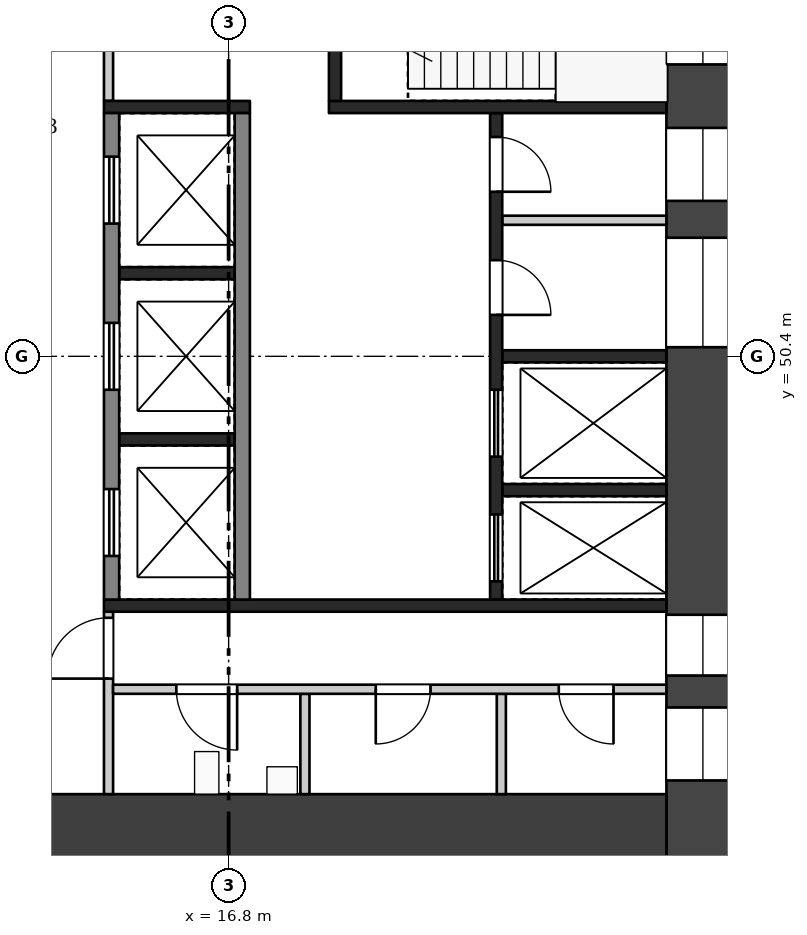
"""IFC4 building model, lengths in metres.
Left out: names, types, materials, properties, quantities, classifications, styles, units other than length and angle.
Written with IfcOpenShell. Run it as: python <this file> out.ifc"""

import sys

from ifc_helpers import new_model, si_unit, direction, frame, frame_2d, origin, place, context, subcontext, project, spatial, rectangle, extrude, element, fill, save


model = new_model("IFC4")
c1 = context("Model", 3, precision=1e-05, world=origin(), true_north=direction((0.0, 1.0)))
c2 = subcontext(c1, "Body", "Model", "MODEL_VIEW")
j1 = project(units=[si_unit("LENGTHUNIT", "METRE"), si_unit("PLANEANGLEUNIT", "RADIAN")], contexts=[c1])
p1 = place(None, origin())
s1 = spatial("IfcSite", under=j1, at=p1, CompositionType="ELEMENT")
p2 = place(p1, origin())
s2 = spatial("IfcBuilding", under=s1, at=p2, CompositionType="ELEMENT")
p3 = place(p2, frame((0.0, 0.0, 189.7)))
s3 = spatial("IfcBuildingStorey", under=s2, at=p3, CompositionType="ELEMENT", Elevation=189.7)
p4 = place(p3, frame((24.6, 58.8, 0.0), z_axis=(0.0, 0.0, 1.0), x_axis=(0.0, -1.0, 0.0)))
e1 = element("IfcWall", 1, at=p4, inside=s3, PredefinedType="SHEAR", context=c2, shape_type="SweptSolid", body=[
    extrude(rectangle(XDim=16.8, YDim=1.2, at=frame_2d((8.4, 0.0))), origin(), (0.0, 0.0, 1.0), 3.22),
])
p5 = place(p4, frame((1.8, 0.0, 0.5)))
e2 = element("IfcOpeningElement", 2, at=p5, cuts=e1, PredefinedType="OPENING", context=c2, shape_type="SweptSolid", body=[
    extrude(rectangle(XDim=1.8, YDim=2.4, at=frame_2d((0.9, 1.2))), frame((0.0, 0.61, 0.0), z_axis=(0.0, -1.0, 0.0), x_axis=(1.0, 0.0, 0.0)), (0.0, 0.0, 1.0), 1.22),
])
p6 = place(p4, frame((4.644, 0.0, 1.6)))
e3 = element("IfcOpeningElement", 3, at=p6, cuts=e1, PredefinedType="OPENING", context=c2, shape_type="SweptSolid", body=[
    extrude(rectangle(XDim=1.2, YDim=1.2, at=frame_2d((0.6, 0.6))), frame((0.0, 0.61, 0.0), z_axis=(0.0, -1.0, 0.0), x_axis=(1.0, 0.0, 0.0)), (0.0, 0.0, 1.0), 1.22),
])
p7 = place(p4, frame((6.45, 0.0, 1.6)))
e4 = element("IfcOpeningElement", 4, at=p7, cuts=e1, PredefinedType="OPENING", context=c2, shape_type="SweptSolid", body=[
    extrude(rectangle(XDim=1.8, YDim=1.2, at=frame_2d((0.9, 0.6))), frame((0.0, 0.61, 0.0), z_axis=(0.0, -1.0, 0.0), x_axis=(1.0, 0.0, 0.0)), (0.0, 0.0, 1.0), 1.22),
])
p8 = place(p4, frame((12.65, 0.0, 0.6)))
e5 = element("IfcOpeningElement", 5, at=p8, cuts=e1, PredefinedType="OPENING", context=c2, shape_type="SweptSolid", body=[
    extrude(rectangle(XDim=1.0, YDim=2.1, at=frame_2d((0.5, 1.05))), frame((0.0, 0.61, 0.0), z_axis=(0.0, -1.0, 0.0), x_axis=(1.0, 0.0, 0.0)), (0.0, 0.0, 1.0), 1.22),
])
p9 = place(p4, frame((14.175, 0.0, 1.6)))
e6 = element("IfcOpeningElement", 6, at=p9, cuts=e1, PredefinedType="OPENING", context=c2, shape_type="SweptSolid", body=[
    extrude(rectangle(XDim=1.2, YDim=1.2, at=frame_2d((0.6, 0.6))), frame((0.0, 0.61, 0.0), z_axis=(0.0, -1.0, 0.0), x_axis=(1.0, 0.0, 0.0)), (0.0, 0.0, 1.0), 1.22),
])
p10 = place(p3, frame((9.6, 42.6, 0.0), z_axis=(0.0, 0.0, 1.0), x_axis=(1.0, 0.0, 0.0)))
e7 = element("IfcWall", 7, at=p10, inside=s3, PredefinedType="SHEAR", context=c2, shape_type="SweptSolid", body=[
    extrude(rectangle(XDim=14.4, YDim=1.2, at=frame_2d((7.2, 0.0))), origin(), (0.0, 0.0, 1.0), 3.22),
])
p11 = place(p10, frame((2.1, 0.0, 0.0)))
e8 = element("IfcOpeningElement", 8, at=p11, cuts=e7, PredefinedType="OPENING", context=c2, shape_type="SweptSolid", body=[
    extrude(rectangle(XDim=1.8, YDim=2.1, at=frame_2d((0.9, 1.05))), frame((0.0, 0.61, 0.0), z_axis=(0.0, -1.0, 0.0), x_axis=(1.0, 0.0, 0.0)), (0.0, 0.0, 1.0), 1.22),
])
for number, where, z_axis, x_axis in (
    (9, (15.0, 51.767, 0.0), (0.0, 0.0, 1.0), (1.0, 0.0, 0.0)),
    (10, (15.0, 49.033, 0.0), (0.0, 0.0, 1.0), (1.0, 0.0, 0.0)),
):
    element("IfcWall", number, at=place(p3, frame(where, z_axis=z_axis, x_axis=x_axis)), inside=s3, PredefinedType="SHEAR", context=c2, shape_type="SweptSolid", body=[
        extrude(rectangle(XDim=1.9, YDim=0.2, at=frame_2d((0.95, 0.0))), origin(), (0.0, 0.0, 1.0), 3.22),
    ])
p12 = place(p3, frame((14.875, 54.4, 0.0), z_axis=(0.0, 0.0, 1.0), x_axis=(0.0, -1.0, 0.0)))
e11 = element("IfcWall", 11, at=p12, inside=s3, PredefinedType="SHEAR", context=c2, shape_type="SweptSolid", body=[
    extrude(rectangle(XDim=8.0, YDim=0.25, at=frame_2d((4.0, 0.0))), origin(), (0.0, 0.0, 1.0), 3.22),
])
p13 = place(p12, frame((0.717, 0.0, 0.0)))
e12 = element("IfcOpeningElement", 12, at=p13, cuts=e11, PredefinedType="OPENING", context=c2, shape_type="SweptSolid", body=[
    extrude(rectangle(XDim=1.1, YDim=2.1, at=frame_2d((0.55, 1.05))), frame((0.0, 0.135, 0.0), z_axis=(0.0, -1.0, 0.0), x_axis=(1.0, 0.0, 0.0)), (0.0, 0.0, 1.0), 0.27),
])
p14 = place(p12, frame((3.45, 0.0, 0.0)))
e13 = element("IfcOpeningElement", 13, at=p14, cuts=e11, PredefinedType="OPENING", context=c2, shape_type="SweptSolid", body=[
    extrude(rectangle(XDim=1.1, YDim=2.1, at=frame_2d((0.55, 1.05))), frame((0.0, 0.135, 0.0), z_axis=(0.0, -1.0, 0.0), x_axis=(1.0, 0.0, 0.0)), (0.0, 0.0, 1.0), 0.27),
])
p15 = place(p12, frame((6.183, 0.0, 0.0)))
e14 = element("IfcOpeningElement", 14, at=p15, cuts=e11, PredefinedType="OPENING", context=c2, shape_type="SweptSolid", body=[
    extrude(rectangle(XDim=1.1, YDim=2.1, at=frame_2d((0.55, 1.05))), frame((0.0, 0.135, 0.0), z_axis=(0.0, -1.0, 0.0), x_axis=(1.0, 0.0, 0.0)), (0.0, 0.0, 1.0), 0.27),
])
p16 = place(p3, frame((17.025, 54.4, 0.0), z_axis=(0.0, 0.0, 1.0), x_axis=(0.0, -1.0, 0.0)))
e15 = element("IfcWall", 15, at=p16, inside=s3, PredefinedType="SHEAR", context=c2, shape_type="SweptSolid", body=[
    extrude(rectangle(XDim=8.0, YDim=0.25, at=frame_2d((4.0, 0.0))), origin(), (0.0, 0.0, 1.0), 3.22),
])
for number, where, z_axis, x_axis in (
    (16, (21.3, 50.4, 0.0), (0.0, 0.0, 1.0), (1.0, 0.0, 0.0)),
    (17, (21.3, 48.2, 0.0), (0.0, 0.0, 1.0), (1.0, 0.0, 0.0)),
):
    element("IfcWall", number, at=place(p3, frame(where, z_axis=z_axis, x_axis=x_axis)), inside=s3, PredefinedType="SHEAR", context=c2, shape_type="SweptSolid", body=[
        extrude(rectangle(XDim=2.7, YDim=0.2, at=frame_2d((1.35, 0.0))), origin(), (0.0, 0.0, 1.0), 3.22),
    ])
p17 = place(p3, frame((21.3, 52.637, 0.0), z_axis=(0.0, 0.0, 1.0), x_axis=(1.0, 0.0, 0.0)))
e18 = element("IfcWall", 18, at=p17, inside=s3, PredefinedType="PARTITIONING", context=c2, shape_type="SweptSolid", body=[
    extrude(rectangle(XDim=2.7, YDim=0.15, at=frame_2d((1.35, 0.0))), origin(), (0.0, 0.0, 1.0), 3.22),
])
p18 = place(p3, frame((21.2, 54.4, 0.0), z_axis=(0.0, 0.0, 1.0), x_axis=(0.0, -1.0, 0.0)))
e19 = element("IfcWall", 19, at=p18, inside=s3, PredefinedType="SHEAR", context=c2, shape_type="SweptSolid", body=[
    extrude(rectangle(XDim=8.0, YDim=0.2, at=frame_2d((4.0, 0.0))), origin(), (0.0, 0.0, 1.0), 3.22),
])
p19 = place(p18, frame((0.394, 0.0, 0.0)))
e20 = element("IfcOpeningElement", 20, at=p19, cuts=e19, PredefinedType="OPENING", context=c2, shape_type="SweptSolid", body=[
    extrude(rectangle(XDim=0.9, YDim=2.1, at=frame_2d((0.45, 1.05))), frame((0.0, 0.11, 0.0), z_axis=(0.0, -1.0, 0.0), x_axis=(1.0, 0.0, 0.0)), (0.0, 0.0, 1.0), 0.22),
])
p20 = place(p18, frame((2.419, 0.0, 0.0)))
e21 = element("IfcOpeningElement", 21, at=p20, cuts=e19, PredefinedType="OPENING", context=c2, shape_type="SweptSolid", body=[
    extrude(rectangle(XDim=0.9, YDim=2.1, at=frame_2d((0.45, 1.05))), frame((0.0, 0.11, 0.0), z_axis=(0.0, -1.0, 0.0), x_axis=(1.0, 0.0, 0.0)), (0.0, 0.0, 1.0), 0.22),
])
p21 = place(p18, frame((4.55, 0.0, 0.0)))
e22 = element("IfcOpeningElement", 22, at=p21, cuts=e19, PredefinedType="OPENING", context=c2, shape_type="SweptSolid", body=[
    extrude(rectangle(XDim=1.1, YDim=2.1, at=frame_2d((0.55, 1.05))), frame((0.0, 0.11, 0.0), z_axis=(0.0, -1.0, 0.0), x_axis=(1.0, 0.0, 0.0)), (0.0, 0.0, 1.0), 0.22),
])
p22 = place(p18, frame((6.6, 0.0, 0.0)))
e23 = element("IfcOpeningElement", 23, at=p22, cuts=e19, PredefinedType="OPENING", context=c2, shape_type="SweptSolid", body=[
    extrude(rectangle(XDim=1.1, YDim=2.1, at=frame_2d((0.55, 1.05))), frame((0.0, 0.11, 0.0), z_axis=(0.0, -1.0, 0.0), x_axis=(1.0, 0.0, 0.0)), (0.0, 0.0, 1.0), 0.22),
])
p23 = place(p3, frame((14.75, 54.5, 0.0), z_axis=(0.0, 0.0, 1.0), x_axis=(1.0, 0.0, 0.0)))
e24 = element("IfcWall", 24, at=p23, inside=s3, PredefinedType="SHEAR", context=c2, shape_type="SweptSolid", body=[
    extrude(rectangle(XDim=2.4, YDim=0.2, at=frame_2d((1.2, 0.0))), origin(), (0.0, 0.0, 1.0), 3.22),
])
p24 = place(p3, frame((18.45, 54.5, 0.0), z_axis=(0.0, 0.0, 1.0), x_axis=(1.0, 0.0, 0.0)))
e25 = element("IfcWall", 25, at=p24, inside=s3, PredefinedType="SHEAR", context=c2, shape_type="SweptSolid", body=[
    extrude(rectangle(XDim=5.55, YDim=0.2, at=frame_2d((2.775, 0.0))), origin(), (0.0, 0.0, 1.0), 3.22),
])
p25 = place(p3, frame((14.825, 57.6, 0.0), z_axis=(0.0, 0.0, 1.0), x_axis=(0.0, -1.0, 0.0)))
e26 = element("IfcWall", 26, at=p25, inside=s3, PredefinedType="PARTITIONING", context=c2, shape_type="SweptSolid", body=[
    extrude(rectangle(XDim=3.0, YDim=0.15, at=frame_2d((1.5, 0.0))), origin(), (0.0, 0.0, 1.0), 3.22),
])
p26 = place(p25, frame((1.0, 0.0, 0.0)))
e27 = element("IfcOpeningElement", 27, at=p26, cuts=e26, PredefinedType="OPENING", context=c2, shape_type="SweptSolid", body=[
    extrude(rectangle(XDim=1.0, YDim=2.1, at=frame_2d((0.5, 1.05))), frame((0.0, 0.085, 0.0), z_axis=(0.0, -1.0, 0.0), x_axis=(1.0, 0.0, 0.0)), (0.0, 0.0, 1.0), 0.17),
])
p27 = place(p3, frame((18.55, 57.6, 0.0), z_axis=(0.0, 0.0, 1.0), x_axis=(0.0, -1.0, 0.0)))
e28 = element("IfcWall", 28, at=p27, inside=s3, PredefinedType="SHEAR", context=c2, shape_type="SweptSolid", body=[
    extrude(rectangle(XDim=3.0, YDim=0.2, at=frame_2d((1.5, 0.0))), origin(), (0.0, 0.0, 1.0), 3.22),
])
p28 = place(p27, frame((1.0, 0.0, 0.0)))
e29 = element("IfcOpeningElement", 29, at=p28, cuts=e28, PredefinedType="OPENING", context=c2, shape_type="SweptSolid", body=[
    extrude(rectangle(XDim=1.0, YDim=2.1, at=frame_2d((0.5, 1.05))), frame((0.0, 0.11, 0.0), z_axis=(0.0, -1.0, 0.0), x_axis=(1.0, 0.0, 0.0)), (0.0, 0.0, 1.0), 0.22),
])
p29 = place(p3, frame((14.75, 46.3, 0.0), z_axis=(0.0, 0.0, 1.0), x_axis=(1.0, 0.0, 0.0)))
e30 = element("IfcWall", 30, at=p29, inside=s3, PredefinedType="SHEAR", context=c2, shape_type="SweptSolid", body=[
    extrude(rectangle(XDim=9.25, YDim=0.2, at=frame_2d((4.625, 0.0))), origin(), (0.0, 0.0, 1.0), 3.22),
])
p30 = place(p3, frame((14.825, 46.2, 0.0), z_axis=(0.0, 0.0, 1.0), x_axis=(0.0, -1.0, 0.0)))
e31 = element("IfcWall", 31, at=p30, inside=s3, PredefinedType="PARTITIONING", context=c2, shape_type="SweptSolid", body=[
    extrude(rectangle(XDim=3.0, YDim=0.15, at=frame_2d((1.5, 0.0))), origin(), (0.0, 0.0, 1.0), 3.22),
])
p31 = place(p30, frame((0.1, 0.0, 0.0)))
e32 = element("IfcOpeningElement", 32, at=p31, cuts=e31, PredefinedType="OPENING", context=c2, shape_type="SweptSolid", body=[
    extrude(rectangle(XDim=1.0, YDim=2.1, at=frame_2d((0.5, 1.05))), frame((0.0, 0.085, 0.0), z_axis=(0.0, -1.0, 0.0), x_axis=(1.0, 0.0, 0.0)), (0.0, 0.0, 1.0), 0.17),
])
for number, where, z_axis, x_axis in (
    (33, (18.055, 44.85, 0.0), (0.0, 0.0, 1.0), (0.0, -1.0, 0.0)),
    (34, (21.285, 44.85, 0.0), (0.0, 0.0, 1.0), (0.0, -1.0, 0.0)),
):
    element("IfcWall", number, at=place(p3, frame(where, z_axis=z_axis, x_axis=x_axis)), inside=s3, PredefinedType="PARTITIONING", context=c2, shape_type="SweptSolid", body=[
        extrude(rectangle(XDim=1.65, YDim=0.15, at=frame_2d((0.825, 0.0))), origin(), (0.0, 0.0, 1.0), 3.22),
    ])
p32 = place(p3, frame((14.9, 44.925, 0.0), z_axis=(0.0, 0.0, 1.0), x_axis=(1.0, 0.0, 0.0)))
e35 = element("IfcWall", 35, at=p32, inside=s3, PredefinedType="PARTITIONING", context=c2, shape_type="SweptSolid", body=[
    extrude(rectangle(XDim=9.1, YDim=0.15, at=frame_2d((4.55, 0.0))), origin(), (0.0, 0.0, 1.0), 3.22),
])
p33 = place(p32, frame((1.04, 0.0, 0.0)))
e36 = element("IfcOpeningElement", 36, at=p33, cuts=e35, PredefinedType="OPENING", context=c2, shape_type="SweptSolid", body=[
    extrude(rectangle(XDim=1.0, YDim=2.1, at=frame_2d((0.5, 1.05))), frame((0.0, 0.085, 0.0), z_axis=(0.0, -1.0, 0.0), x_axis=(1.0, 0.0, 0.0)), (0.0, 0.0, 1.0), 0.17),
])
p34 = place(p32, frame((4.32, 0.0, 0.0)))
e37 = element("IfcOpeningElement", 37, at=p34, cuts=e35, PredefinedType="OPENING", context=c2, shape_type="SweptSolid", body=[
    extrude(rectangle(XDim=0.9, YDim=2.1, at=frame_2d((0.45, 1.05))), frame((0.0, 0.085, 0.0), z_axis=(0.0, -1.0, 0.0), x_axis=(1.0, 0.0, 0.0)), (0.0, 0.0, 1.0), 0.17),
])
p35 = place(p32, frame((7.33, 0.0, 0.0)))
e38 = element("IfcOpeningElement", 38, at=p35, cuts=e35, PredefinedType="OPENING", context=c2, shape_type="SweptSolid", body=[
    extrude(rectangle(XDim=0.9, YDim=2.1, at=frame_2d((0.45, 1.05))), frame((0.0, 0.085, 0.0), z_axis=(0.0, -1.0, 0.0), x_axis=(1.0, 0.0, 0.0)), (0.0, 0.0, 1.0), 0.17),
])
p36 = place(p13, origin())
e39 = element("IfcDoor", 39, at=p36, inside=s3, OperationType="DOUBLE_DOOR_SLIDING", PredefinedType="DOOR", context=c2, shape_type="SweptSolid", body=[
    extrude(rectangle(XDim=1.1, YDim=2.1, at=frame_2d((0.55, 1.05))), frame((0.0, 0.025, 0.0), z_axis=(0.0, -1.0, 0.0), x_axis=(1.0, 0.0, 0.0)), (0.0, 0.0, 1.0), 0.05),
])
fill(e12, e39)
p37 = place(p14, origin())
e40 = element("IfcDoor", 40, at=p37, inside=s3, OperationType="DOUBLE_DOOR_SLIDING", PredefinedType="DOOR", context=c2, shape_type="SweptSolid", body=[
    extrude(rectangle(XDim=1.1, YDim=2.1, at=frame_2d((0.55, 1.05))), frame((0.0, 0.025, 0.0), z_axis=(0.0, -1.0, 0.0), x_axis=(1.0, 0.0, 0.0)), (0.0, 0.0, 1.0), 0.05),
])
fill(e13, e40)
p38 = place(p15, origin())
e41 = element("IfcDoor", 41, at=p38, inside=s3, OperationType="DOUBLE_DOOR_SLIDING", PredefinedType="DOOR", context=c2, shape_type="SweptSolid", body=[
    extrude(rectangle(XDim=1.1, YDim=2.1, at=frame_2d((0.55, 1.05))), frame((0.0, 0.025, 0.0), z_axis=(0.0, -1.0, 0.0), x_axis=(1.0, 0.0, 0.0)), (0.0, 0.0, 1.0), 0.05),
])
fill(e14, e41)
p39 = place(p19, origin())
e42 = element("IfcDoor", 42, at=p39, inside=s3, OperationType="SINGLE_SWING_RIGHT", PredefinedType="DOOR", context=c2, shape_type="SweptSolid", body=[
    extrude(rectangle(XDim=0.9, YDim=2.1, at=frame_2d((0.45, 1.05))), frame((0.0, 0.025, 0.0), z_axis=(0.0, -1.0, 0.0), x_axis=(1.0, 0.0, 0.0)), (0.0, 0.0, 1.0), 0.05),
])
fill(e20, e42)
p40 = place(p20, origin())
e43 = element("IfcDoor", 43, at=p40, inside=s3, OperationType="SINGLE_SWING_RIGHT", PredefinedType="DOOR", context=c2, shape_type="SweptSolid", body=[
    extrude(rectangle(XDim=0.9, YDim=2.1, at=frame_2d((0.45, 1.05))), frame((0.0, 0.025, 0.0), z_axis=(0.0, -1.0, 0.0), x_axis=(1.0, 0.0, 0.0)), (0.0, 0.0, 1.0), 0.05),
])
fill(e21, e43)
p41 = place(p21, origin())
e44 = element("IfcDoor", 44, at=p41, inside=s3, OperationType="DOUBLE_DOOR_SLIDING", PredefinedType="DOOR", context=c2, shape_type="SweptSolid", body=[
    extrude(rectangle(XDim=1.1, YDim=2.1, at=frame_2d((0.55, 1.05))), frame((0.0, 0.025, 0.0), z_axis=(0.0, -1.0, 0.0), x_axis=(1.0, 0.0, 0.0)), (0.0, 0.0, 1.0), 0.05),
])
fill(e22, e44)
p42 = place(p22, origin())
e45 = element("IfcDoor", 45, at=p42, inside=s3, OperationType="DOUBLE_DOOR_SLIDING", PredefinedType="DOOR", context=c2, shape_type="SweptSolid", body=[
    extrude(rectangle(XDim=1.1, YDim=2.1, at=frame_2d((0.55, 1.05))), frame((0.0, 0.025, 0.0), z_axis=(0.0, -1.0, 0.0), x_axis=(1.0, 0.0, 0.0)), (0.0, 0.0, 1.0), 0.05),
])
fill(e23, e45)
p43 = place(p31, frame((1.0, 0.0, 0.0), z_axis=(0.0, 0.0, 1.0), x_axis=(-1.0, 0.0, 0.0)))
e46 = element("IfcDoor", 46, at=p43, inside=s3, OperationType="SINGLE_SWING_LEFT", PredefinedType="DOOR", context=c2, shape_type="SweptSolid", body=[
    extrude(rectangle(XDim=1.0, YDim=2.1, at=frame_2d((0.5, 1.05))), frame((0.0, 0.025, 0.0), z_axis=(0.0, -1.0, 0.0), x_axis=(1.0, 0.0, 0.0)), (0.0, 0.0, 1.0), 0.05),
])
fill(e32, e46)
p44 = place(p33, frame((1.0, 0.0, 0.0), z_axis=(0.0, 0.0, 1.0), x_axis=(-1.0, 0.0, 0.0)))
e47 = element("IfcDoor", 47, at=p44, inside=s3, OperationType="SINGLE_SWING_LEFT", PredefinedType="DOOR", context=c2, shape_type="SweptSolid", body=[
    extrude(rectangle(XDim=1.0, YDim=2.1, at=frame_2d((0.5, 1.05))), frame((0.0, 0.025, 0.0), z_axis=(0.0, -1.0, 0.0), x_axis=(1.0, 0.0, 0.0)), (0.0, 0.0, 1.0), 0.05),
])
fill(e36, e47)
p45 = place(p34, frame((0.9, 0.0, 0.0), z_axis=(0.0, 0.0, 1.0), x_axis=(-1.0, 0.0, 0.0)))
e48 = element("IfcDoor", 48, at=p45, inside=s3, OperationType="SINGLE_SWING_RIGHT", PredefinedType="DOOR", context=c2, shape_type="SweptSolid", body=[
    extrude(rectangle(XDim=0.9, YDim=2.1, at=frame_2d((0.45, 1.05))), frame((0.0, 0.025, 0.0), z_axis=(0.0, -1.0, 0.0), x_axis=(1.0, 0.0, 0.0)), (0.0, 0.0, 1.0), 0.05),
])
fill(e37, e48)
p46 = place(p35, frame((0.9, 0.0, 0.0), z_axis=(0.0, 0.0, 1.0), x_axis=(-1.0, 0.0, 0.0)))
e49 = element("IfcDoor", 49, at=p46, inside=s3, OperationType="SINGLE_SWING_LEFT", PredefinedType="DOOR", context=c2, shape_type="SweptSolid", body=[
    extrude(rectangle(XDim=0.9, YDim=2.1, at=frame_2d((0.45, 1.05))), frame((0.0, 0.025, 0.0), z_axis=(0.0, -1.0, 0.0), x_axis=(1.0, 0.0, 0.0)), (0.0, 0.0, 1.0), 0.05),
])
fill(e38, e49)
p47 = place(p5, origin())
e50 = element("IfcWindow", 50, at=p47, inside=s3, PartitioningType="SINGLE_PANEL", PredefinedType="WINDOW", context=c2, shape_type="SweptSolid", body=[
    extrude(rectangle(XDim=1.8, YDim=2.4, at=frame_2d((0.9, 1.2))), frame((0.0, 0.03, 0.0), z_axis=(0.0, -1.0, 0.0), x_axis=(1.0, 0.0, 0.0)), (0.0, 0.0, 1.0), 0.06),
])
fill(e2, e50)
p48 = place(p6, origin())
e51 = element("IfcWindow", 51, at=p48, inside=s3, PartitioningType="SINGLE_PANEL", PredefinedType="WINDOW", context=c2, shape_type="SweptSolid", body=[
    extrude(rectangle(XDim=1.2, YDim=1.2, at=frame_2d((0.6, 0.6))), frame((0.0, 0.03, 0.0), z_axis=(0.0, -1.0, 0.0), x_axis=(1.0, 0.0, 0.0)), (0.0, 0.0, 1.0), 0.06),
])
fill(e3, e51)
p49 = place(p7, origin())
e52 = element("IfcWindow", 52, at=p49, inside=s3, PartitioningType="SINGLE_PANEL", PredefinedType="WINDOW", context=c2, shape_type="SweptSolid", body=[
    extrude(rectangle(XDim=1.8, YDim=1.2, at=frame_2d((0.9, 0.6))), frame((0.0, 0.03, 0.0), z_axis=(0.0, -1.0, 0.0), x_axis=(1.0, 0.0, 0.0)), (0.0, 0.0, 1.0), 0.06),
])
fill(e4, e52)
p50 = place(p8, origin())
e53 = element("IfcWindow", 53, at=p50, inside=s3, PartitioningType="SINGLE_PANEL", PredefinedType="WINDOW", context=c2, shape_type="SweptSolid", body=[
    extrude(rectangle(XDim=1.0, YDim=2.1, at=frame_2d((0.5, 1.05))), frame((0.0, 0.03, 0.0), z_axis=(0.0, -1.0, 0.0), x_axis=(1.0, 0.0, 0.0)), (0.0, 0.0, 1.0), 0.06),
])
fill(e5, e53)
p51 = place(p9, origin())
e54 = element("IfcWindow", 54, at=p51, inside=s3, PartitioningType="SINGLE_PANEL", PredefinedType="WINDOW", context=c2, shape_type="SweptSolid", body=[
    extrude(rectangle(XDim=1.2, YDim=1.2, at=frame_2d((0.6, 0.6))), frame((0.0, 0.03, 0.0), z_axis=(0.0, -1.0, 0.0), x_axis=(1.0, 0.0, 0.0)), (0.0, 0.0, 1.0), 0.06),
])
fill(e6, e54)
save(model, sys.argv[1])
